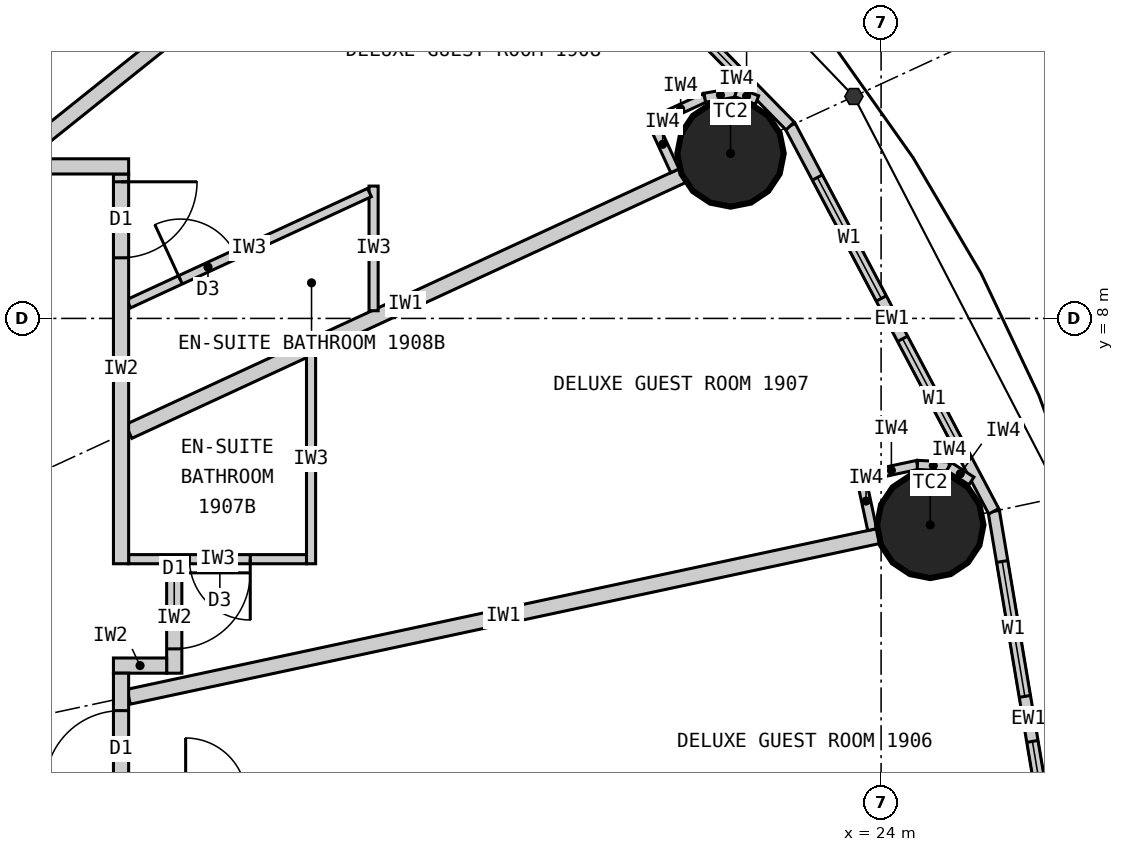
"""IFC4 building model, lengths in metres.
Left out: names, types, materials, properties, quantities, classifications, styles, units other than length and angle.
Written with IfcOpenShell. Run it as: python <this file> out.ifc"""

import sys

from ifc_helpers import new_model, si_unit, direction, frame, frame_2d, origin, origin_2d, place, context, subcontext, project, spatial, rectangle, circle, extrude, element, fill, save


model = new_model("IFC4")
c1 = context("Model", 3, precision=1e-05, world=origin(), true_north=direction((0.0, 1.0)))
c2 = subcontext(c1, "Body", "Model", "MODEL_VIEW")
j1 = project(units=[si_unit("LENGTHUNIT", "METRE"), si_unit("PLANEANGLEUNIT", "RADIAN")], contexts=[c1])
p1 = place(None, origin())
s1 = spatial("IfcSite", under=j1, at=p1, CompositionType="ELEMENT")
p2 = place(p1, origin())
s2 = spatial("IfcBuilding", under=s1, at=p2, CompositionType="ELEMENT")
p3 = place(p2, frame((0.0, 0.0, 77.1)))
s3 = spatial("IfcBuildingStorey", under=s2, at=p3, CompositionType="ELEMENT", Elevation=77.1)
for number, where, z_axis, x_axis in (
    (1, (24.647, 5.283, 0.0), (0.0, 0.0, 1.0), (1.0, 0.0, 0.0)),
    (2, (22.019, 10.17, 0.0), (0.0, 0.0, 1.0), (1.0, 0.0, 0.0)),
):
    element("IfcColumn", number, at=place(p3, frame(where, z_axis=z_axis, x_axis=x_axis)), inside=s3, PredefinedType="COLUMN", context=c2, shape_type="SweptSolid", body=[
        extrude(circle(Radius=0.7, at=origin_2d()), origin(), (0.0, 0.0, 1.0), 3.3),
    ])
p4 = place(p3, frame((26.4, 0.0, 0.0), z_axis=(0.0, 0.0, 1.0), x_axis=(-0.165642551694, 0.986185857264, 0.0)))
e3 = element("IfcWall", 3, at=p4, inside=s3, PredefinedType="ELEMENTEDWALL", context=c2, shape_type="SweptSolid", body=[
    extrude(rectangle(XDim=5.539, YDim=0.15, at=frame_2d((2.77, 0.0))), origin(), (0.0, 0.0, 1.0), 3.12),
])
p5 = place(p4, frame((0.669, 0.0, 0.9)))
e4 = element("IfcOpeningElement", 4, at=p5, cuts=e3, PredefinedType="OPENING", context=c2, shape_type="SweptSolid", body=[
    extrude(rectangle(XDim=1.8, YDim=1.9, at=frame_2d((0.9, 0.95))), frame((0.0, 0.085, 0.0), z_axis=(0.0, -1.0, 0.0), x_axis=(1.0, 0.0, 0.0)), (0.0, 0.0, 1.0), 0.17),
])
p6 = place(p4, frame((3.07, 0.0, 0.9)))
e5 = element("IfcOpeningElement", 5, at=p6, cuts=e3, PredefinedType="OPENING", context=c2, shape_type="SweptSolid", body=[
    extrude(rectangle(XDim=1.8, YDim=1.9, at=frame_2d((0.9, 0.95))), frame((0.0, 0.085, 0.0), z_axis=(0.0, -1.0, 0.0), x_axis=(1.0, 0.0, 0.0)), (0.0, 0.0, 1.0), 0.17),
])
p7 = place(p3, frame((25.482, 5.462, 0.0), z_axis=(0.0, 0.0, 1.0), x_axis=(-0.467296867008, 0.884100468321, 0.0)))
e6 = element("IfcWall", 6, at=p7, inside=s3, PredefinedType="ELEMENTEDWALL", context=c2, shape_type="SweptSolid", body=[
    extrude(rectangle(XDim=5.734, YDim=0.15, at=frame_2d((2.867, 0.0))), origin(), (0.0, 0.0, 1.0), 3.12),
])
p8 = place(p7, frame((0.767, 0.0, 0.9)))
e7 = element("IfcOpeningElement", 7, at=p8, cuts=e6, PredefinedType="OPENING", context=c2, shape_type="SweptSolid", body=[
    extrude(rectangle(XDim=1.8, YDim=1.9, at=frame_2d((0.9, 0.95))), frame((0.0, 0.085, 0.0), z_axis=(0.0, -1.0, 0.0), x_axis=(1.0, 0.0, 0.0)), (0.0, 0.0, 1.0), 0.17),
])
p9 = place(p7, frame((3.167, 0.0, 0.9)))
e8 = element("IfcOpeningElement", 8, at=p9, cuts=e6, PredefinedType="OPENING", context=c2, shape_type="SweptSolid", body=[
    extrude(rectangle(XDim=1.8, YDim=1.9, at=frame_2d((0.9, 0.95))), frame((0.0, 0.085, 0.0), z_axis=(0.0, -1.0, 0.0), x_axis=(1.0, 0.0, 0.0)), (0.0, 0.0, 1.0), 0.17),
])
p10 = place(p3, frame((22.803, 10.532, 0.0), z_axis=(0.0, 0.0, 1.0), x_axis=(-0.699602905915, 0.714531856557, 0.0)))
e9 = element("IfcWall", 9, at=p10, inside=s3, PredefinedType="ELEMENTEDWALL", context=c2, shape_type="SweptSolid", body=[
    extrude(rectangle(XDim=6.051, YDim=0.15, at=frame_2d((3.025, 0.0))), origin(), (0.0, 0.0, 1.0), 3.12),
])
p11 = place(p10, frame((0.926, 0.0, 0.9)))
e10 = element("IfcOpeningElement", 10, at=p11, cuts=e9, PredefinedType="OPENING", context=c2, shape_type="SweptSolid", body=[
    extrude(rectangle(XDim=1.8, YDim=1.9, at=frame_2d((0.9, 0.95))), frame((0.0, 0.085, 0.0), z_axis=(0.0, -1.0, 0.0), x_axis=(1.0, 0.0, 0.0)), (0.0, 0.0, 1.0), 0.17),
])
p12 = place(p10, frame((3.325, 0.0, 0.9)))
e11 = element("IfcOpeningElement", 11, at=p12, cuts=e9, PredefinedType="OPENING", context=c2, shape_type="SweptSolid", body=[
    extrude(rectangle(XDim=1.8, YDim=1.9, at=frame_2d((0.9, 0.95))), frame((0.0, 0.085, 0.0), z_axis=(0.0, -1.0, 0.0), x_axis=(1.0, 0.0, 0.0)), (0.0, 0.0, 1.0), 0.17),
])
p13 = place(p3, frame((14.1, 3.022, 0.0), z_axis=(0.0, 0.0, 1.0), x_axis=(0.977790014929, 0.209586943072, 0.0)))
e12 = element("IfcWall", 12, at=p13, inside=s3, PredefinedType="PARTITIONING", context=c2, shape_type="SweptSolid", body=[
    extrude(rectangle(XDim=10.087, YDim=0.2, at=frame_2d((5.043, 0.0))), origin(), (0.0, 0.0, 1.0), 2.32),
])
p14 = place(p3, frame((14.1, 6.512, 0.0), z_axis=(0.0, 0.0, 1.0), x_axis=(0.907832871056, 0.419332181247, 0.0)))
e13 = element("IfcWall", 13, at=p14, inside=s3, PredefinedType="PARTITIONING", context=c2, shape_type="SweptSolid", body=[
    extrude(rectangle(XDim=8.023, YDim=0.2, at=frame_2d((4.011, 0.0))), origin(), (0.0, 0.0, 1.0), 2.32),
])
p15 = place(p3, frame((12.625, 10.1, 0.0), z_axis=(0.0, 0.0, 1.0), x_axis=(0.780892451574, 0.624665493744, 0.0)))
e14 = element("IfcWall", 14, at=p15, inside=s3, PredefinedType="PARTITIONING", context=c2, shape_type="SweptSolid", body=[
    extrude(rectangle(XDim=6.045, YDim=0.2, at=frame_2d((3.022, 0.0))), origin(), (0.0, 0.0, 1.0), 2.32),
])
p16 = place(p3, frame((16.5, 7.521, 0.0), z_axis=(0.0, 0.0, 1.0), x_axis=(0.0, -1.0, 0.0)))
e15 = element("IfcWall", 15, at=p16, inside=s3, PredefinedType="PARTITIONING", context=c2, shape_type="SweptSolid", body=[
    extrude(rectangle(XDim=2.749, YDim=0.12, at=frame_2d((1.374, 0.0))), origin(), (0.0, 0.0, 1.0), 3.12),
])
p17 = place(p3, frame((14.1, 4.833, 0.0), z_axis=(0.0, 0.0, 1.0), x_axis=(1.0, 0.0, 0.0)))
e16 = element("IfcWall", 16, at=p17, inside=s3, PredefinedType="PARTITIONING", context=c2, shape_type="SweptSolid", body=[
    extrude(rectangle(XDim=2.34, YDim=0.12, at=frame_2d((1.17, 0.0))), origin(), (0.0, 0.0, 1.0), 3.12),
])
p18 = place(p17, frame((0.8, 0.0, 0.0)))
e17 = element("IfcOpeningElement", 17, at=p18, cuts=e16, PredefinedType="OPENING", context=c2, shape_type="SweptSolid", body=[
    extrude(rectangle(XDim=0.8, YDim=2.1, at=frame_2d((0.4, 1.05))), frame((0.0, 0.07, 0.0), z_axis=(0.0, -1.0, 0.0), x_axis=(1.0, 0.0, 0.0)), (0.0, 0.0, 1.0), 0.14),
])
p19 = place(p3, frame((17.323, 8.101, 0.0), z_axis=(0.0, 0.0, 1.0), x_axis=(0.0, 1.0, 0.0)))
e18 = element("IfcWall", 18, at=p19, inside=s3, PredefinedType="PARTITIONING", context=c2, shape_type="SweptSolid", body=[
    extrude(rectangle(XDim=1.64, YDim=0.12, at=frame_2d((0.82, 0.0))), origin(), (0.0, 0.0, 1.0), 3.12),
])
p20 = place(p3, frame((14.1, 8.193, 0.0), z_axis=(0.0, 0.0, 1.0), x_axis=(0.907836493557, 0.419324338628, 0.0)))
e19 = element("IfcWall", 19, at=p20, inside=s3, PredefinedType="PARTITIONING", context=c2, shape_type="SweptSolid", body=[
    extrude(rectangle(XDim=3.49, YDim=0.12, at=frame_2d((1.745, 0.0))), origin(), (0.0, 0.0, 1.0), 3.12),
])
p21 = place(p20, frame((0.75, 0.0, 0.0)))
e20 = element("IfcOpeningElement", 20, at=p21, cuts=e19, PredefinedType="OPENING", context=c2, shape_type="SweptSolid", body=[
    extrude(rectangle(XDim=0.8, YDim=2.1, at=frame_2d((0.4, 1.05))), frame((0.0, 0.07, 0.0), z_axis=(0.0, -1.0, 0.0), x_axis=(1.0, 0.0, 0.0)), (0.0, 0.0, 1.0), 0.14),
])
p22 = place(p3, frame((14.7, 3.333, 0.0), z_axis=(0.0, 0.0, 1.0), x_axis=(0.0, 1.0, 0.0)))
e21 = element("IfcWall", 21, at=p22, inside=s3, PredefinedType="PARTITIONING", context=c2, shape_type="SweptSolid", body=[
    extrude(rectangle(XDim=1.44, YDim=0.2, at=frame_2d((0.72, 0.0))), origin(), (0.0, 0.0, 1.0), 3.12),
])
p23 = place(p22, frame((0.32, 0.0, 0.0)))
e22 = element("IfcOpeningElement", 22, at=p23, cuts=e21, PredefinedType="OPENING", context=c2, shape_type="SweptSolid", body=[
    extrude(rectangle(XDim=1.0, YDim=2.2, at=frame_2d((0.5, 1.1))), frame((0.0, 0.11, 0.0), z_axis=(0.0, -1.0, 0.0), x_axis=(1.0, 0.0, 0.0)), (0.0, 0.0, 1.0), 0.22),
])
p24 = place(p3, frame((13.9, 3.433, 0.0), z_axis=(0.0, 0.0, 1.0), x_axis=(1.0, 0.0, 0.0)))
e23 = element("IfcWall", 23, at=p24, inside=s3, PredefinedType="PARTITIONING", context=c2, shape_type="SweptSolid", body=[
    extrude(rectangle(XDim=0.7, YDim=0.2, at=frame_2d((0.35, 0.0))), origin(), (0.0, 0.0, 1.0), 2.32),
])
p25 = place(p3, frame((14.0, -9.9, 0.0), z_axis=(0.0, 0.0, 1.0), x_axis=(0.0, 1.0, 0.0)))
e24 = element("IfcWall", 24, at=p25, inside=s3, PredefinedType="PARTITIONING", context=c2, shape_type="SweptSolid", body=[
    extrude(rectangle(XDim=13.232, YDim=0.2, at=frame_2d((6.616, 0.0))), origin(), (0.0, 0.0, 1.0), 3.12),
])
p26 = place(p25, frame((4.948, 0.0, 0.0)))
e25 = element("IfcOpeningElement", 25, at=p26, cuts=e24, PredefinedType="OPENING", context=c2, shape_type="SweptSolid", body=[
    extrude(rectangle(XDim=1.0, YDim=2.2, at=frame_2d((0.5, 1.1))), frame((0.0, 0.11, 0.0), z_axis=(0.0, -1.0, 0.0), x_axis=(1.0, 0.0, 0.0)), (0.0, 0.0, 1.0), 0.22),
])
p27 = place(p25, frame((8.718, 0.0, 0.0)))
e26 = element("IfcOpeningElement", 26, at=p27, cuts=e24, PredefinedType="OPENING", context=c2, shape_type="SweptSolid", body=[
    extrude(rectangle(XDim=1.0, YDim=2.2, at=frame_2d((0.5, 1.1))), frame((0.0, 0.11, 0.0), z_axis=(0.0, -1.0, 0.0), x_axis=(1.0, 0.0, 0.0)), (0.0, 0.0, 1.0), 0.22),
])
p28 = place(p25, frame((11.74, 0.0, 0.0)))
e27 = element("IfcOpeningElement", 27, at=p28, cuts=e24, PredefinedType="OPENING", context=c2, shape_type="SweptSolid", body=[
    extrude(rectangle(XDim=1.0, YDim=2.2, at=frame_2d((0.5, 1.1))), frame((0.0, 0.11, 0.0), z_axis=(0.0, -1.0, 0.0), x_axis=(1.0, 0.0, 0.0)), (0.0, 0.0, 1.0), 0.22),
])
p29 = place(p3, frame((14.0, 4.772, 0.0), z_axis=(0.0, 0.0, 1.0), x_axis=(0.0, 1.0, 0.0)))
e28 = element("IfcWall", 28, at=p29, inside=s3, PredefinedType="PARTITIONING", context=c2, shape_type="SweptSolid", body=[
    extrude(rectangle(XDim=5.127, YDim=0.2, at=frame_2d((2.564, 0.0))), origin(), (0.0, 0.0, 1.0), 3.12),
])
p30 = place(p29, frame((4.025, 0.0, 0.0)))
e29 = element("IfcOpeningElement", 29, at=p30, cuts=e28, PredefinedType="OPENING", context=c2, shape_type="SweptSolid", body=[
    extrude(rectangle(XDim=1.0, YDim=2.2, at=frame_2d((0.5, 1.1))), frame((0.0, 0.11, 0.0), z_axis=(0.0, -1.0, 0.0), x_axis=(1.0, 0.0, 0.0)), (0.0, 0.0, 1.0), 0.22),
])
p31 = place(p3, frame((10.885, 10.0, 0.0), z_axis=(0.0, 0.0, 1.0), x_axis=(1.0, 0.0, 0.0)))
e30 = element("IfcWall", 30, at=p31, inside=s3, PredefinedType="PARTITIONING", context=c2, shape_type="SweptSolid", body=[
    extrude(rectangle(XDim=3.215, YDim=0.2, at=frame_2d((1.607, 0.0))), origin(), (0.0, 0.0, 1.0), 3.12),
])
p32 = place(p3, frame((23.883, 5.222, 0.0), z_axis=(0.0, 0.0, 1.0), x_axis=(-0.209311842415, 0.977848941619, 0.0)))
e31 = element("IfcWall", 31, at=p32, inside=s3, PredefinedType="PARTITIONING", context=c2, shape_type="SweptSolid", body=[
    extrude(rectangle(XDim=0.768, YDim=0.12, at=frame_2d((0.384, 0.0))), origin(), (0.0, 0.0, 1.0), 3.12),
])
p33 = place(p3, frame((23.793, 5.926, 0.0), z_axis=(0.0, 0.0, 1.0), x_axis=(0.977792206673, 0.209576717621, 0.0)))
e32 = element("IfcWall", 32, at=p33, inside=s3, PredefinedType="PARTITIONING", context=c2, shape_type="SweptSolid", body=[
    extrude(rectangle(XDim=0.7, YDim=0.12, at=frame_2d((0.35, 0.0))), origin(), (0.0, 0.0, 1.0), 3.12),
])
p34 = place(p3, frame((24.478, 6.073, 0.0), z_axis=(0.0, 0.0, 1.0), x_axis=(0.998708262812, -0.05081147302, 0.0)))
e33 = element("IfcWall", 33, at=p34, inside=s3, PredefinedType="PARTITIONING", context=c2, shape_type="SweptSolid", body=[
    extrude(rectangle(XDim=0.418, YDim=0.12, at=frame_2d((0.209, 0.0))), origin(), (0.0, 0.0, 1.0), 3.12),
])
p35 = place(p3, frame((24.895, 6.052, 0.0), z_axis=(0.0, 0.0, 1.0), x_axis=(0.839495197275, -0.54336710772, 0.0)))
e34 = element("IfcWall", 34, at=p35, inside=s3, PredefinedType="PARTITIONING", context=c2, shape_type="SweptSolid", body=[
    extrude(rectangle(XDim=0.35, YDim=0.12, at=frame_2d((0.175, 0.0))), origin(), (0.0, 0.0, 1.0), 3.12),
])
p36 = place(p3, frame((21.287, 9.942, 0.0), z_axis=(0.0, 0.0, 1.0), x_axis=(-0.419259891039, 0.907866258744, 0.0)))
e35 = element("IfcWall", 35, at=p36, inside=s3, PredefinedType="PARTITIONING", context=c2, shape_type="SweptSolid", body=[
    extrude(rectangle(XDim=0.768, YDim=0.12, at=frame_2d((0.384, 0.0))), origin(), (0.0, 0.0, 1.0), 3.12),
])
p37 = place(p3, frame((21.045, 10.61, 0.0), z_axis=(0.0, 0.0, 1.0), x_axis=(0.907877701396, 0.419235112208, 0.0)))
e36 = element("IfcWall", 36, at=p37, inside=s3, PredefinedType="PARTITIONING", context=c2, shape_type="SweptSolid", body=[
    extrude(rectangle(XDim=0.7, YDim=0.12, at=frame_2d((0.35, 0.0))), origin(), (0.0, 0.0, 1.0), 3.12),
])
p38 = place(p3, frame((21.68, 10.903, 0.0), z_axis=(0.0, 0.0, 1.0), x_axis=(0.985446622073, 0.169985161247, 0.0)))
e37 = element("IfcWall", 37, at=p38, inside=s3, PredefinedType="PARTITIONING", context=c2, shape_type="SweptSolid", body=[
    extrude(rectangle(XDim=0.418, YDim=0.12, at=frame_2d((0.209, 0.0))), origin(), (0.0, 0.0, 1.0), 3.12),
])
p39 = place(p3, frame((22.092, 10.974, 0.0), z_axis=(0.0, 0.0, 1.0), x_axis=(0.938428160676, -0.345474437912, 0.0)))
e38 = element("IfcWall", 38, at=p39, inside=s3, PredefinedType="PARTITIONING", context=c2, shape_type="SweptSolid", body=[
    extrude(rectangle(XDim=0.294, YDim=0.12, at=frame_2d((0.147, 0.0))), origin(), (0.0, 0.0, 1.0), 3.12),
])
p40 = place(p5, origin())
e39 = element("IfcWindow", 39, at=p40, inside=s3, PartitioningType="SINGLE_PANEL", PredefinedType="WINDOW", context=c2, shape_type="SweptSolid", body=[
    extrude(rectangle(XDim=1.8, YDim=1.9, at=frame_2d((0.9, 0.95))), frame((0.0, 0.03, 0.0), z_axis=(0.0, -1.0, 0.0), x_axis=(1.0, 0.0, 0.0)), (0.0, 0.0, 1.0), 0.06),
])
fill(e4, e39)
p41 = place(p6, origin())
e40 = element("IfcWindow", 40, at=p41, inside=s3, PartitioningType="SINGLE_PANEL", PredefinedType="WINDOW", context=c2, shape_type="SweptSolid", body=[
    extrude(rectangle(XDim=1.8, YDim=1.9, at=frame_2d((0.9, 0.95))), frame((0.0, 0.03, 0.0), z_axis=(0.0, -1.0, 0.0), x_axis=(1.0, 0.0, 0.0)), (0.0, 0.0, 1.0), 0.06),
])
fill(e5, e40)
p42 = place(p8, origin())
e41 = element("IfcWindow", 41, at=p42, inside=s3, PartitioningType="SINGLE_PANEL", PredefinedType="WINDOW", context=c2, shape_type="SweptSolid", body=[
    extrude(rectangle(XDim=1.8, YDim=1.9, at=frame_2d((0.9, 0.95))), frame((0.0, 0.03, 0.0), z_axis=(0.0, -1.0, 0.0), x_axis=(1.0, 0.0, 0.0)), (0.0, 0.0, 1.0), 0.06),
])
fill(e7, e41)
p43 = place(p9, origin())
e42 = element("IfcWindow", 42, at=p43, inside=s3, PartitioningType="SINGLE_PANEL", PredefinedType="WINDOW", context=c2, shape_type="SweptSolid", body=[
    extrude(rectangle(XDim=1.8, YDim=1.9, at=frame_2d((0.9, 0.95))), frame((0.0, 0.03, 0.0), z_axis=(0.0, -1.0, 0.0), x_axis=(1.0, 0.0, 0.0)), (0.0, 0.0, 1.0), 0.06),
])
fill(e8, e42)
p44 = place(p11, origin())
e43 = element("IfcWindow", 43, at=p44, inside=s3, PartitioningType="SINGLE_PANEL", PredefinedType="WINDOW", context=c2, shape_type="SweptSolid", body=[
    extrude(rectangle(XDim=1.8, YDim=1.9, at=frame_2d((0.9, 0.95))), frame((0.0, 0.03, 0.0), z_axis=(0.0, -1.0, 0.0), x_axis=(1.0, 0.0, 0.0)), (0.0, 0.0, 1.0), 0.06),
])
fill(e10, e43)
p45 = place(p28, origin())
e44 = element("IfcDoor", 44, at=p45, inside=s3, OperationType="SINGLE_SWING_LEFT", PredefinedType="DOOR", context=c2, shape_type="SweptSolid", body=[
    extrude(rectangle(XDim=1.0, YDim=2.2, at=frame_2d((0.5, 1.1))), frame((0.0, 0.025, 0.0), z_axis=(0.0, -1.0, 0.0), x_axis=(1.0, 0.0, 0.0)), (0.0, 0.0, 1.0), 0.05),
])
fill(e27, e44)
p46 = place(p18, origin())
e45 = element("IfcDoor", 45, at=p46, inside=s3, OperationType="SINGLE_SWING_RIGHT", PredefinedType="DOOR", context=c2, shape_type="SweptSolid", body=[
    extrude(rectangle(XDim=0.8, YDim=2.1, at=frame_2d((0.4, 1.05))), frame((0.0, 0.025, 0.0), z_axis=(0.0, -1.0, 0.0), x_axis=(1.0, 0.0, 0.0)), (0.0, 0.0, 1.0), 0.05),
])
fill(e17, e45)
p47 = place(p23, origin())
e46 = element("IfcDoor", 46, at=p47, inside=s3, OperationType="SINGLE_SWING_RIGHT", PredefinedType="DOOR", context=c2, shape_type="SweptSolid", body=[
    extrude(rectangle(XDim=1.0, YDim=2.2, at=frame_2d((0.5, 1.1))), frame((0.0, 0.025, 0.0), z_axis=(0.0, -1.0, 0.0), x_axis=(1.0, 0.0, 0.0)), (0.0, 0.0, 1.0), 0.05),
])
fill(e22, e46)
p48 = place(p21, origin())
e47 = element("IfcDoor", 47, at=p48, inside=s3, OperationType="SINGLE_SWING_LEFT", PredefinedType="DOOR", context=c2, shape_type="SweptSolid", body=[
    extrude(rectangle(XDim=0.8, YDim=2.1, at=frame_2d((0.4, 1.05))), frame((0.0, 0.025, 0.0), z_axis=(0.0, -1.0, 0.0), x_axis=(1.0, 0.0, 0.0)), (0.0, 0.0, 1.0), 0.05),
])
fill(e20, e47)
p49 = place(p30, origin())
e48 = element("IfcDoor", 48, at=p49, inside=s3, OperationType="SINGLE_SWING_RIGHT", PredefinedType="DOOR", context=c2, shape_type="SweptSolid", body=[
    extrude(rectangle(XDim=1.0, YDim=2.2, at=frame_2d((0.5, 1.1))), frame((0.0, 0.025, 0.0), z_axis=(0.0, -1.0, 0.0), x_axis=(1.0, 0.0, 0.0)), (0.0, 0.0, 1.0), 0.05),
])
fill(e29, e48)
save(model, sys.argv[1])
